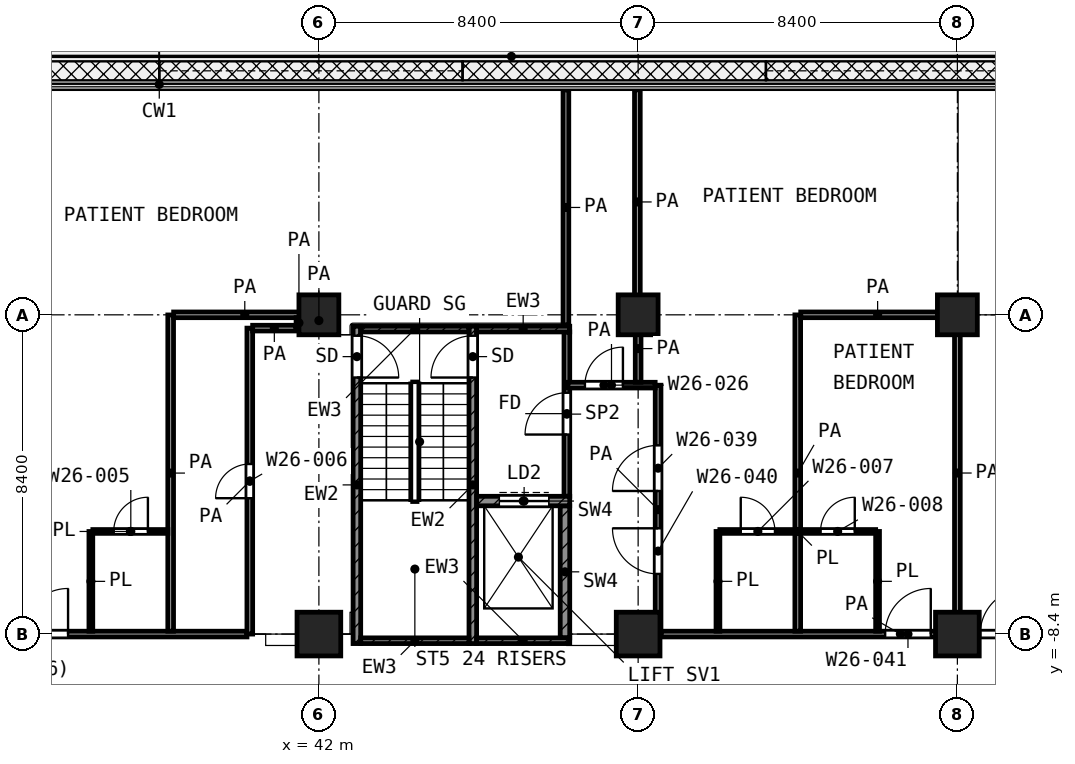
"""IFC4 building model, lengths in metres.
Left out: names, types, materials, properties, quantities, classifications, styles, units other than length and angle.
Written with IfcOpenShell. Run it as: python <this file> out.ifc"""

import sys

from ifc_helpers import new_model, si_unit, direction, frame, frame_2d, origin, origin_2d, place, context, subcontext, project, spatial, rectangle, extrude, element, fill, save


model = new_model("IFC4")
c1 = context("Model", 3, precision=1e-05, world=origin(), true_north=direction((0.0, 1.0)))
c2 = subcontext(c1, "Body", "Model", "MODEL_VIEW")
j1 = project(units=[si_unit("LENGTHUNIT", "METRE"), si_unit("PLANEANGLEUNIT", "RADIAN")], contexts=[c1])
p1 = place(None, origin())
s1 = spatial("IfcSite", under=j1, at=p1, CompositionType="ELEMENT")
p2 = place(p1, origin())
s2 = spatial("IfcBuilding", under=s1, at=p2, CompositionType="ELEMENT")
p3 = place(p2, frame((0.0, 0.0, 136.6)))
s3 = spatial("IfcBuildingStorey", under=s2, at=p3, CompositionType="ELEMENT", Elevation=136.6)
for number, where, z_axis, x_axis in (
    (1, (42.0, 0.0, 0.0), (0.0, 0.0, 1.0), (1.0, 0.0, 0.0)),
    (2, (50.4, 0.0, 0.0), (0.0, 0.0, 1.0), (1.0, 0.0, 0.0)),
    (3, (58.8, 0.0, 0.0), (0.0, 0.0, 1.0), (1.0, 0.0, 0.0)),
):
    element("IfcColumn", number, at=place(p3, frame(where, z_axis=z_axis, x_axis=x_axis)), inside=s3, PredefinedType="COLUMN", context=c2, shape_type="SweptSolid", body=[
        extrude(rectangle(XDim=1.05, YDim=1.05, at=origin_2d()), origin(), (0.0, 0.0, 1.0), 4.2),
    ])
for number, where, z_axis, x_axis in (
    (4, (42.0, -8.4, 0.0), (0.0, 0.0, 1.0), (1.0, 0.0, 0.0)),
    (5, (50.4, -8.4, 0.0), (0.0, 0.0, 1.0), (1.0, 0.0, 0.0)),
    (6, (58.8, -8.4, 0.0), (0.0, 0.0, 1.0), (1.0, 0.0, 0.0)),
):
    element("IfcColumn", number, at=place(p3, frame(where, z_axis=z_axis, x_axis=x_axis)), inside=s3, PredefinedType="COLUMN", context=c2, shape_type="SweptSolid", body=[
        extrude(rectangle(XDim=1.15, YDim=1.15, at=origin_2d()), origin(), (0.0, 0.0, 1.0), 4.2),
    ])
p4 = place(p3, frame((43.0, -8.65, 0.0), z_axis=(0.0, 0.0, 1.0), x_axis=(0.0, 1.0, 0.0)))
e7 = element("IfcWall", 7, at=p4, inside=s3, PredefinedType="SHEAR", context=c2, shape_type="SweptSolid", body=[
    extrude(rectangle(XDim=8.35, YDim=0.2, at=frame_2d((4.175, 0.0))), origin(), (0.0, 0.0, 1.0), 3.6),
])
p5 = place(p4, frame((7.0, 0.0, 0.0)))
e8 = element("IfcOpeningElement", 8, at=p5, cuts=e7, PredefinedType="OPENING", context=c2, shape_type="SweptSolid", body=[
    extrude(rectangle(XDim=1.1, YDim=2.1, at=frame_2d((0.55, 1.05))), frame((0.0, 0.11, 0.0), z_axis=(0.0, -1.0, 0.0), x_axis=(1.0, 0.0, 0.0)), (0.0, 0.0, 1.0), 0.22),
])
p6 = place(p3, frame((46.05, -8.65, 0.0), z_axis=(0.0, 0.0, 1.0), x_axis=(0.0, 1.0, 0.0)))
e9 = element("IfcWall", 9, at=p6, inside=s3, PredefinedType="SHEAR", context=c2, shape_type="SweptSolid", body=[
    extrude(rectangle(XDim=8.35, YDim=0.2, at=frame_2d((4.175, 0.0))), origin(), (0.0, 0.0, 1.0), 3.6),
])
p7 = place(p6, frame((7.0, 0.0, 0.0)))
e10 = element("IfcOpeningElement", 10, at=p7, cuts=e9, PredefinedType="OPENING", context=c2, shape_type="SweptSolid", body=[
    extrude(rectangle(XDim=1.1, YDim=2.1, at=frame_2d((0.55, 1.05))), frame((0.0, 0.11, 0.0), z_axis=(0.0, -1.0, 0.0), x_axis=(1.0, 0.0, 0.0)), (0.0, 0.0, 1.0), 0.22),
])
p8 = place(p3, frame((43.1, -0.375, 0.0), z_axis=(0.0, 0.0, 1.0), x_axis=(1.0, 0.0, 0.0)))
e11 = element("IfcWall", 11, at=p8, inside=s3, PredefinedType="SHEAR", context=c2, shape_type="SweptSolid", body=[
    extrude(rectangle(XDim=2.85, YDim=0.15, at=frame_2d((1.425, 0.0))), origin(), (0.0, 0.0, 1.0), 3.6),
])
p9 = place(p3, frame((46.15, -0.375, 0.0), z_axis=(0.0, 0.0, 1.0), x_axis=(1.0, 0.0, 0.0)))
e12 = element("IfcWall", 12, at=p9, inside=s3, PredefinedType="SHEAR", context=c2, shape_type="SweptSolid", body=[
    extrude(rectangle(XDim=2.45, YDim=0.15, at=frame_2d((1.225, 0.0))), origin(), (0.0, 0.0, 1.0), 3.6),
])
p10 = place(p3, frame((43.1, -8.575, 0.0), z_axis=(0.0, 0.0, 1.0), x_axis=(1.0, 0.0, 0.0)))
e13 = element("IfcWall", 13, at=p10, inside=s3, PredefinedType="SHEAR", context=c2, shape_type="SweptSolid", body=[
    extrude(rectangle(XDim=2.85, YDim=0.15, at=frame_2d((1.425, 0.0))), origin(), (0.0, 0.0, 1.0), 3.6),
])
p11 = place(p3, frame((46.15, -8.575, 0.0), z_axis=(0.0, 0.0, 1.0), x_axis=(1.0, 0.0, 0.0)))
e14 = element("IfcWall", 14, at=p11, inside=s3, PredefinedType="SHEAR", context=c2, shape_type="SweptSolid", body=[
    extrude(rectangle(XDim=2.45, YDim=0.15, at=frame_2d((1.225, 0.0))), origin(), (0.0, 0.0, 1.0), 3.6),
])
p12 = place(p3, frame((46.15, -4.9, 0.0), z_axis=(0.0, 0.0, 1.0), x_axis=(1.0, 0.0, 0.0)))
e15 = element("IfcWall", 15, at=p12, inside=s3, PredefinedType="SHEAR", context=c2, shape_type="SweptSolid", body=[
    extrude(rectangle(XDim=2.45, YDim=0.25, at=frame_2d((1.225, 0.0))), origin(), (0.0, 0.0, 1.0), 3.6),
])
p13 = place(p12, frame((0.6, 0.0, 0.0)))
e16 = element("IfcOpeningElement", 16, at=p13, cuts=e15, PredefinedType="OPENING", context=c2, shape_type="SweptSolid", body=[
    extrude(rectangle(XDim=1.3, YDim=2.1, at=frame_2d((0.65, 1.05))), frame((0.0, 0.135, 0.0), z_axis=(0.0, -1.0, 0.0), x_axis=(1.0, 0.0, 0.0)), (0.0, 0.0, 1.0), 0.27),
])
p14 = place(p3, frame((48.475, -8.5, 0.0), z_axis=(0.0, 0.0, 1.0), x_axis=(0.0, 1.0, 0.0)))
e17 = element("IfcWall", 17, at=p14, inside=s3, PredefinedType="SHEAR", context=c2, shape_type="SweptSolid", body=[
    extrude(rectangle(XDim=3.475, YDim=0.25, at=frame_2d((1.738, 0.0))), origin(), (0.0, 0.0, 1.0), 3.6),
])
p15 = place(p3, frame((48.525, -4.775, 0.0), z_axis=(0.0, 0.0, 1.0), x_axis=(0.0, 1.0, 0.0)))
e18 = element("IfcWall", 18, at=p15, inside=s3, PredefinedType="PARTITIONING", context=c2, shape_type="SweptSolid", body=[
    extrude(rectangle(XDim=4.325, YDim=0.15, at=frame_2d((2.163, 0.0))), origin(), (0.0, 0.0, 1.0), 3.6),
])
p16 = place(p15, frame((1.625, 0.0, 0.0)))
e19 = element("IfcOpeningElement", 19, at=p16, cuts=e18, PredefinedType="OPENING", context=c2, shape_type="SweptSolid", body=[
    extrude(rectangle(XDim=1.1, YDim=2.1, at=frame_2d((0.55, 1.05))), frame((0.0, 0.085, 0.0), z_axis=(0.0, -1.0, 0.0), x_axis=(1.0, 0.0, 0.0)), (0.0, 0.0, 1.0), 0.17),
])
p17 = place(p3, frame((36.052, -5.7, 0.0), z_axis=(0.0, 0.0, 1.0), x_axis=(1.0, 0.0, 0.0)))
e20 = element("IfcWall", 20, at=p17, inside=s3, PredefinedType="PARTITIONING", context=c2, shape_type="SweptSolid", body=[
    extrude(rectangle(XDim=1.973, YDim=0.1, at=frame_2d((0.986, 0.0))), origin(), (0.0, 0.0, 1.0), 3.6),
])
p18 = place(p17, frame((0.549, 0.0, 0.0)))
e21 = element("IfcOpeningElement", 21, at=p18, cuts=e20, PredefinedType="OPENING", context=c2, shape_type="SweptSolid", body=[
    extrude(rectangle(XDim=0.9, YDim=2.1, at=frame_2d((0.45, 1.05))), frame((0.0, 0.06, 0.0), z_axis=(0.0, -1.0, 0.0), x_axis=(1.0, 0.0, 0.0)), (0.0, 0.0, 1.0), 0.12),
])
p19 = place(p3, frame((52.55, -5.7, 0.0), z_axis=(0.0, 0.0, 1.0), x_axis=(1.0, 0.0, 0.0)))
e22 = element("IfcWall", 22, at=p19, inside=s3, PredefinedType="PARTITIONING", context=c2, shape_type="SweptSolid", body=[
    extrude(rectangle(XDim=4.1, YDim=0.1, at=frame_2d((2.05, 0.0))), origin(), (0.0, 0.0, 1.0), 3.6),
])
p20 = place(p19, frame((0.55, 0.0, 0.0)))
e23 = element("IfcOpeningElement", 23, at=p20, cuts=e22, PredefinedType="OPENING", context=c2, shape_type="SweptSolid", body=[
    extrude(rectangle(XDim=0.9, YDim=2.1, at=frame_2d((0.45, 1.05))), frame((0.0, 0.06, 0.0), z_axis=(0.0, -1.0, 0.0), x_axis=(1.0, 0.0, 0.0)), (0.0, 0.0, 1.0), 0.12),
])
p21 = place(p19, frame((2.65, 0.0, 0.0)))
e24 = element("IfcOpeningElement", 24, at=p21, cuts=e22, PredefinedType="OPENING", context=c2, shape_type="SweptSolid", body=[
    extrude(rectangle(XDim=0.9, YDim=2.1, at=frame_2d((0.45, 1.05))), frame((0.0, 0.06, 0.0), z_axis=(0.0, -1.0, 0.0), x_axis=(1.0, 0.0, 0.0)), (0.0, 0.0, 1.0), 0.12),
])
p22 = place(p3, frame((36.0, -8.325, 0.0), z_axis=(0.0, 0.0, 1.0), x_axis=(0.0, 1.0, 0.0)))
e25 = element("IfcWall", 25, at=p22, inside=s3, PredefinedType="PARTITIONING", context=c2, shape_type="SweptSolid", body=[
    extrude(rectangle(XDim=2.624, YDim=0.1, at=frame_2d((1.312, 0.0))), origin(), (0.0, 0.0, 1.0), 3.6),
])
for number, where, z_axis, x_axis in (
    (26, (52.5, -8.325, 0.0), (0.0, 0.0, 1.0), (0.0, 1.0, 0.0)),
    (27, (56.7, -8.325, 0.0), (0.0, 0.0, 1.0), (0.0, 1.0, 0.0)),
):
    element("IfcWall", number, at=place(p3, frame(where, z_axis=z_axis, x_axis=x_axis)), inside=s3, PredefinedType="PARTITIONING", context=c2, shape_type="SweptSolid", body=[
        extrude(rectangle(XDim=2.625, YDim=0.1, at=frame_2d((1.312, 0.0))), origin(), (0.0, 0.0, 1.0), 3.6),
    ])
p23 = place(p3, frame((25.0, -8.4, 0.0), z_axis=(0.0, 0.0, 1.0), x_axis=(1.0, 0.0, 0.0)))
e28 = element("IfcWall", 28, at=p23, inside=s3, PredefinedType="PARTITIONING", context=c2, shape_type="SweptSolid", body=[
    extrude(rectangle(XDim=15.107, YDim=0.15, at=frame_2d((7.553, 0.0))), origin(), (0.0, 0.0, 1.0), 3.6),
])
p24 = place(p23, frame((3.65, 0.0, 0.0)))
e29 = element("IfcOpeningElement", 29, at=p24, cuts=e28, PredefinedType="OPENING", context=c2, shape_type="SweptSolid", body=[
    extrude(rectangle(XDim=1.5, YDim=2.1, at=frame_2d((0.75, 1.05))), frame((0.0, 0.085, 0.0), z_axis=(0.0, -1.0, 0.0), x_axis=(1.0, 0.0, 0.0)), (0.0, 0.0, 1.0), 0.17),
])
p25 = place(p23, frame((9.2, 0.0, 0.0)))
e30 = element("IfcOpeningElement", 30, at=p25, cuts=e28, PredefinedType="OPENING", context=c2, shape_type="SweptSolid", body=[
    extrude(rectangle(XDim=1.2, YDim=2.1, at=frame_2d((0.6, 1.05))), frame((0.0, 0.085, 0.0), z_axis=(0.0, -1.0, 0.0), x_axis=(1.0, 0.0, 0.0)), (0.0, 0.0, 1.0), 0.17),
])
p26 = place(p3, frame((51.0, -8.4, 0.0), z_axis=(0.0, 0.0, 1.0), x_axis=(1.0, 0.0, 0.0)))
e31 = element("IfcWall", 31, at=p26, inside=s3, PredefinedType="PARTITIONING", context=c2, shape_type="SweptSolid", body=[
    extrude(rectangle(XDim=12.6, YDim=0.15, at=frame_2d((6.3, 0.0))), origin(), (0.0, 0.0, 1.0), 3.6),
])
p27 = place(p26, frame((5.9, 0.0, 0.0)))
e32 = element("IfcOpeningElement", 32, at=p27, cuts=e31, PredefinedType="OPENING", context=c2, shape_type="SweptSolid", body=[
    extrude(rectangle(XDim=1.2, YDim=2.1, at=frame_2d((0.6, 1.05))), frame((0.0, 0.085, 0.0), z_axis=(0.0, -1.0, 0.0), x_axis=(1.0, 0.0, 0.0)), (0.0, 0.0, 1.0), 0.17),
])
p28 = place(p26, frame((8.4, 0.0, 0.0)))
e33 = element("IfcOpeningElement", 33, at=p28, cuts=e31, PredefinedType="OPENING", context=c2, shape_type="SweptSolid", body=[
    extrude(rectangle(XDim=1.2, YDim=2.1, at=frame_2d((0.6, 1.05))), frame((0.0, 0.085, 0.0), z_axis=(0.0, -1.0, 0.0), x_axis=(1.0, 0.0, 0.0)), (0.0, 0.0, 1.0), 0.17),
])
p29 = place(p3, frame((48.55, -1.85, 0.0), z_axis=(0.0, 0.0, 1.0), x_axis=(1.0, 0.0, 0.0)))
e34 = element("IfcWall", 34, at=p29, inside=s3, PredefinedType="PARTITIONING", context=c2, shape_type="SweptSolid", body=[
    extrude(rectangle(XDim=2.298, YDim=0.15, at=frame_2d((1.149, 0.0))), origin(), (0.0, 0.0, 1.0), 3.6),
])
p30 = place(p29, frame((0.45, 0.0, 0.0)))
e35 = element("IfcOpeningElement", 35, at=p30, cuts=e34, PredefinedType="OPENING", context=c2, shape_type="SweptSolid", body=[
    extrude(rectangle(XDim=1.0, YDim=2.1, at=frame_2d((0.5, 1.05))), frame((0.0, 0.085, 0.0), z_axis=(0.0, -1.0, 0.0), x_axis=(1.0, 0.0, 0.0)), (0.0, 0.0, 1.0), 0.17),
])
p31 = place(p3, frame((40.257, -0.35, 0.0), z_axis=(0.0, 0.0, 1.0), x_axis=(1.0, 0.0, 0.0)))
e36 = element("IfcWall", 36, at=p31, inside=s3, PredefinedType="PARTITIONING", context=c2, shape_type="SweptSolid", body=[
    extrude(rectangle(XDim=1.141, YDim=0.15, at=frame_2d((0.57, 0.0))), origin(), (0.0, 0.0, 1.0), 3.6),
])
p32 = place(p3, frame((38.178, 0.0, 0.0), z_axis=(0.0, 0.0, 1.0), x_axis=(1.0, 0.0, 0.0)))
e37 = element("IfcWall", 37, at=p32, inside=s3, PredefinedType="PARTITIONING", context=c2, shape_type="SweptSolid", body=[
    extrude(rectangle(XDim=3.744, YDim=0.15, at=frame_2d((1.872, 0.0))), origin(), (0.0, 0.0, 1.0), 3.6),
])
p33 = place(p3, frame((54.678, 0.0, 0.0), z_axis=(0.0, 0.0, 1.0), x_axis=(1.0, 0.0, 0.0)))
e38 = element("IfcWall", 38, at=p33, inside=s3, PredefinedType="PARTITIONING", context=c2, shape_type="SweptSolid", body=[
    extrude(rectangle(XDim=4.047, YDim=0.15, at=frame_2d((2.023, 0.0))), origin(), (0.0, 0.0, 1.0), 3.6),
])
p34 = place(p3, frame((38.1, -8.325, 0.0), z_axis=(0.0, 0.0, 1.0), x_axis=(0.0, 1.0, 0.0)))
e39 = element("IfcWall", 39, at=p34, inside=s3, PredefinedType="PARTITIONING", context=c2, shape_type="SweptSolid", body=[
    extrude(rectangle(XDim=8.322, YDim=0.15, at=frame_2d((4.161, 0.0))), origin(), (0.0, 0.0, 1.0), 3.6),
])
p35 = place(p3, frame((40.182, -8.4, 0.0), z_axis=(0.0, 0.0, 1.0), x_axis=(0.0, 1.0, 0.0)))
e40 = element("IfcWall", 40, at=p35, inside=s3, PredefinedType="PARTITIONING", context=c2, shape_type="SweptSolid", body=[
    extrude(rectangle(XDim=8.05, YDim=0.15, at=frame_2d((4.025, 0.0))), origin(), (0.0, 0.0, 1.0), 3.6),
])
p36 = place(p35, frame((3.575, 0.0, 0.0)))
e41 = element("IfcOpeningElement", 41, at=p36, cuts=e40, PredefinedType="OPENING", context=c2, shape_type="SweptSolid", body=[
    extrude(rectangle(XDim=0.9, YDim=2.1, at=frame_2d((0.45, 1.05))), frame((0.0, 0.085, 0.0), z_axis=(0.0, -1.0, 0.0), x_axis=(1.0, 0.0, 0.0)), (0.0, 0.0, 1.0), 0.17),
])
p37 = place(p3, frame((41.475, -0.348, 0.0), z_axis=(0.0, 0.0, 1.0), x_axis=(0.0, 1.0, 0.0)))
e42 = element("IfcWall", 42, at=p37, inside=s3, PredefinedType="PARTITIONING", context=c2, shape_type="SweptSolid", body=[
    extrude(rectangle(XDim=0.273, YDim=0.15, at=frame_2d((0.136, 0.0))), origin(), (0.0, 0.0, 1.0), 3.6),
])
p38 = place(p3, frame((42.0, -0.3, 0.0), z_axis=(0.0, 0.0, 1.0), x_axis=(0.0, 1.0, 0.0)))
e43 = element("IfcWall", 43, at=p38, inside=s3, PredefinedType="PARTITIONING", context=c2, shape_type="SweptSolid", body=[
    extrude(rectangle(XDim=0.297, YDim=0.15, at=frame_2d((0.148, 0.0))), origin(), (0.0, 0.0, 1.0), 3.6),
])
p39 = place(p3, frame((48.5, -0.27, 0.0), z_axis=(0.0, 0.0, 1.0), x_axis=(0.0, 1.0, 0.0)))
e44 = element("IfcWall", 44, at=p39, inside=s3, PredefinedType="PARTITIONING", context=c2, shape_type="SweptSolid", body=[
    extrude(rectangle(XDim=6.19, YDim=0.15, at=frame_2d((3.095, 0.0))), origin(), (0.0, 0.0, 1.0), 3.6),
])
p40 = place(p3, frame((50.38, 0.02, 0.0), z_axis=(0.0, 0.0, 1.0), x_axis=(0.0, 1.0, 0.0)))
e45 = element("IfcWall", 45, at=p40, inside=s3, PredefinedType="PARTITIONING", context=c2, shape_type="SweptSolid", body=[
    extrude(rectangle(XDim=5.9, YDim=0.15, at=frame_2d((2.95, 0.0))), origin(), (0.0, 0.0, 1.0), 3.6),
])
p41 = place(p3, frame((50.4, -1.775, 0.0), z_axis=(0.0, 0.0, 1.0), x_axis=(0.0, 1.0, 0.0)))
e46 = element("IfcWall", 46, at=p41, inside=s3, PredefinedType="PARTITIONING", context=c2, shape_type="SweptSolid", body=[
    extrude(rectangle(XDim=1.773, YDim=0.15, at=frame_2d((0.886, 0.0))), origin(), (0.0, 0.0, 1.0), 3.6),
])
p42 = place(p3, frame((50.925, -8.4, 0.0), z_axis=(0.0, 0.0, 1.0), x_axis=(0.0, 1.0, 0.0)))
e47 = element("IfcWall", 47, at=p42, inside=s3, PredefinedType="PARTITIONING", context=c2, shape_type="SweptSolid", body=[
    extrude(rectangle(XDim=6.548, YDim=0.15, at=frame_2d((3.274, 0.0))), origin(), (0.0, 0.0, 1.0), 3.6),
])
p43 = place(p42, frame((3.765, 0.0, 0.0)))
e48 = element("IfcOpeningElement", 48, at=p43, cuts=e47, PredefinedType="OPENING", context=c2, shape_type="SweptSolid", body=[
    extrude(rectangle(XDim=1.2, YDim=2.1, at=frame_2d((0.6, 1.05))), frame((0.0, 0.085, 0.0), z_axis=(0.0, -1.0, 0.0), x_axis=(1.0, 0.0, 0.0)), (0.0, 0.0, 1.0), 0.17),
])
p44 = place(p42, frame((1.583, 0.0, 0.0)))
e49 = element("IfcOpeningElement", 49, at=p44, cuts=e47, PredefinedType="OPENING", context=c2, shape_type="SweptSolid", body=[
    extrude(rectangle(XDim=1.2, YDim=2.1, at=frame_2d((0.6, 1.05))), frame((0.0, 0.085, 0.0), z_axis=(0.0, -1.0, 0.0), x_axis=(1.0, 0.0, 0.0)), (0.0, 0.0, 1.0), 0.17),
])
p45 = place(p3, frame((54.6, -8.325, 0.0), z_axis=(0.0, 0.0, 1.0), x_axis=(0.0, 1.0, 0.0)))
e50 = element("IfcWall", 50, at=p45, inside=s3, PredefinedType="PARTITIONING", context=c2, shape_type="SweptSolid", body=[
    extrude(rectangle(XDim=8.323, YDim=0.15, at=frame_2d((4.162, 0.0))), origin(), (0.0, 0.0, 1.0), 3.6),
])
p46 = place(p3, frame((58.8, -8.325, 0.0), z_axis=(0.0, 0.0, 1.0), x_axis=(0.0, 1.0, 0.0)))
e51 = element("IfcWall", 51, at=p46, inside=s3, PredefinedType="PARTITIONING", context=c2, shape_type="SweptSolid", body=[
    extrude(rectangle(XDim=8.325, YDim=0.15, at=frame_2d((4.163, 0.0))), origin(), (0.0, 0.0, 1.0), 3.6),
])
p47 = place(p5, frame((1.1, 0.0, 0.0), z_axis=(0.0, 0.0, 1.0), x_axis=(-1.0, 0.0, 0.0)))
e52 = element("IfcDoor", 52, at=p47, inside=s3, OperationType="SINGLE_SWING_LEFT", PredefinedType="DOOR", context=c2, shape_type="SweptSolid", body=[
    extrude(rectangle(XDim=1.1, YDim=2.1, at=frame_2d((0.55, 1.05))), frame((0.0, 0.025, 0.0), z_axis=(0.0, -1.0, 0.0), x_axis=(1.0, 0.0, 0.0)), (0.0, 0.0, 1.0), 0.05),
])
fill(e8, e52)
p48 = place(p7, origin())
e53 = element("IfcDoor", 53, at=p48, inside=s3, OperationType="SINGLE_SWING_LEFT", PredefinedType="DOOR", context=c2, shape_type="SweptSolid", body=[
    extrude(rectangle(XDim=1.1, YDim=2.1, at=frame_2d((0.55, 1.05))), frame((0.0, 0.025, 0.0), z_axis=(0.0, -1.0, 0.0), x_axis=(1.0, 0.0, 0.0)), (0.0, 0.0, 1.0), 0.05),
])
fill(e10, e53)
p49 = place(p13, origin())
e54 = element("IfcDoor", 54, at=p49, inside=s3, OperationType="DOUBLE_DOOR_SLIDING", PredefinedType="DOOR", context=c2, shape_type="SweptSolid", body=[
    extrude(rectangle(XDim=1.3, YDim=2.1, at=frame_2d((0.65, 1.05))), frame((0.0, 0.025, 0.0), z_axis=(0.0, -1.0, 0.0), x_axis=(1.0, 0.0, 0.0)), (0.0, 0.0, 1.0), 0.05),
])
fill(e16, e54)
p50 = place(p16, origin())
e55 = element("IfcDoor", 55, at=p50, inside=s3, OperationType="SINGLE_SWING_LEFT", PredefinedType="DOOR", context=c2, shape_type="SweptSolid", body=[
    extrude(rectangle(XDim=1.1, YDim=2.1, at=frame_2d((0.55, 1.05))), frame((0.0, 0.025, 0.0), z_axis=(0.0, -1.0, 0.0), x_axis=(1.0, 0.0, 0.0)), (0.0, 0.0, 1.0), 0.05),
])
fill(e19, e55)
p51 = place(p25, origin())
e56 = element("IfcDoor", 56, at=p51, inside=s3, OperationType="SINGLE_SWING_RIGHT", PredefinedType="DOOR", context=c2, shape_type="SweptSolid", body=[
    extrude(rectangle(XDim=1.2, YDim=2.1, at=frame_2d((0.6, 1.05))), frame((0.0, 0.025, 0.0), z_axis=(0.0, -1.0, 0.0), x_axis=(1.0, 0.0, 0.0)), (0.0, 0.0, 1.0), 0.05),
])
fill(e30, e56)
p52 = place(p18, origin())
e57 = element("IfcDoor", 57, at=p52, inside=s3, OperationType="SINGLE_SWING_RIGHT", PredefinedType="DOOR", context=c2, shape_type="SweptSolid", body=[
    extrude(rectangle(XDim=0.9, YDim=2.1, at=frame_2d((0.45, 1.05))), frame((0.0, 0.025, 0.0), z_axis=(0.0, -1.0, 0.0), x_axis=(1.0, 0.0, 0.0)), (0.0, 0.0, 1.0), 0.05),
])
fill(e21, e57)
p53 = place(p36, origin())
e58 = element("IfcDoor", 58, at=p53, inside=s3, OperationType="SINGLE_SWING_LEFT", PredefinedType="DOOR", context=c2, shape_type="SweptSolid", body=[
    extrude(rectangle(XDim=0.9, YDim=2.1, at=frame_2d((0.45, 1.05))), frame((0.0, 0.025, 0.0), z_axis=(0.0, -1.0, 0.0), x_axis=(1.0, 0.0, 0.0)), (0.0, 0.0, 1.0), 0.05),
])
fill(e41, e58)
p54 = place(p30, origin())
e59 = element("IfcDoor", 59, at=p54, inside=s3, OperationType="SINGLE_SWING_RIGHT", PredefinedType="DOOR", context=c2, shape_type="SweptSolid", body=[
    extrude(rectangle(XDim=1.0, YDim=2.1, at=frame_2d((0.5, 1.05))), frame((0.0, 0.025, 0.0), z_axis=(0.0, -1.0, 0.0), x_axis=(1.0, 0.0, 0.0)), (0.0, 0.0, 1.0), 0.05),
])
fill(e35, e59)
p55 = place(p43, origin())
e60 = element("IfcDoor", 60, at=p55, inside=s3, OperationType="SINGLE_SWING_LEFT", PredefinedType="DOOR", context=c2, shape_type="SweptSolid", body=[
    extrude(rectangle(XDim=1.2, YDim=2.1, at=frame_2d((0.6, 1.05))), frame((0.0, 0.025, 0.0), z_axis=(0.0, -1.0, 0.0), x_axis=(1.0, 0.0, 0.0)), (0.0, 0.0, 1.0), 0.05),
])
fill(e48, e60)
p56 = place(p44, origin())
e61 = element("IfcDoor", 61, at=p56, inside=s3, OperationType="SINGLE_SWING_RIGHT", PredefinedType="DOOR", context=c2, shape_type="SweptSolid", body=[
    extrude(rectangle(XDim=1.2, YDim=2.1, at=frame_2d((0.6, 1.05))), frame((0.0, 0.025, 0.0), z_axis=(0.0, -1.0, 0.0), x_axis=(1.0, 0.0, 0.0)), (0.0, 0.0, 1.0), 0.05),
])
fill(e49, e61)
p57 = place(p20, origin())
e62 = element("IfcDoor", 62, at=p57, inside=s3, OperationType="SINGLE_SWING_LEFT", PredefinedType="DOOR", context=c2, shape_type="SweptSolid", body=[
    extrude(rectangle(XDim=0.9, YDim=2.1, at=frame_2d((0.45, 1.05))), frame((0.0, 0.025, 0.0), z_axis=(0.0, -1.0, 0.0), x_axis=(1.0, 0.0, 0.0)), (0.0, 0.0, 1.0), 0.05),
])
fill(e23, e62)
p58 = place(p27, origin())
e63 = element("IfcDoor", 63, at=p58, inside=s3, OperationType="SINGLE_SWING_RIGHT", PredefinedType="DOOR", context=c2, shape_type="SweptSolid", body=[
    extrude(rectangle(XDim=1.2, YDim=2.1, at=frame_2d((0.6, 1.05))), frame((0.0, 0.025, 0.0), z_axis=(0.0, -1.0, 0.0), x_axis=(1.0, 0.0, 0.0)), (0.0, 0.0, 1.0), 0.05),
])
fill(e32, e63)
p59 = place(p21, origin())
e64 = element("IfcDoor", 64, at=p59, inside=s3, OperationType="SINGLE_SWING_RIGHT", PredefinedType="DOOR", context=c2, shape_type="SweptSolid", body=[
    extrude(rectangle(XDim=0.9, YDim=2.1, at=frame_2d((0.45, 1.05))), frame((0.0, 0.025, 0.0), z_axis=(0.0, -1.0, 0.0), x_axis=(1.0, 0.0, 0.0)), (0.0, 0.0, 1.0), 0.05),
])
fill(e24, e64)
p60 = place(p28, origin())
e65 = element("IfcDoor", 65, at=p60, inside=s3, OperationType="SINGLE_SWING_RIGHT", PredefinedType="DOOR", context=c2, shape_type="SweptSolid", body=[
    extrude(rectangle(XDim=1.2, YDim=2.1, at=frame_2d((0.6, 1.05))), frame((0.0, 0.025, 0.0), z_axis=(0.0, -1.0, 0.0), x_axis=(1.0, 0.0, 0.0)), (0.0, 0.0, 1.0), 0.05),
])
fill(e33, e65)
save(model, sys.argv[1])
